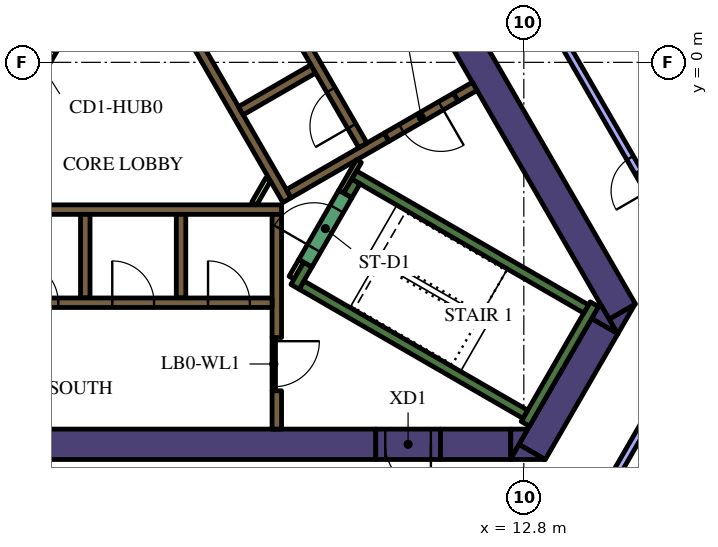
"""IFC4 building model, lengths in metres.
Left out: names, types, materials, properties, quantities, classifications, styles, units other than length and angle.
Written with IfcOpenShell. Run it as: python <this file> out.ifc"""

import sys

from ifc_helpers import new_model, si_unit, direction, frame, frame_2d, origin, place, context, subcontext, project, spatial, polyline, rectangle, outline, extrude, element, fill, save


model = new_model("IFC4")
c1 = context("Model", 3, precision=1e-05, world=origin(), true_north=direction((0.0, 1.0)))
c2 = subcontext(c1, "Body", "Model", "MODEL_VIEW")
j1 = project(units=[si_unit("LENGTHUNIT", "METRE"), si_unit("PLANEANGLEUNIT", "RADIAN")], contexts=[c1])
p1 = place(None, origin())
s1 = spatial("IfcSite", under=j1, at=p1, CompositionType="ELEMENT")
p2 = place(p1, origin())
s2 = spatial("IfcBuilding", under=s1, at=p2, CompositionType="ELEMENT")
p3 = place(p2, frame((0.0, 0.0, 187.8)))
s3 = spatial("IfcBuildingStorey", under=s2, at=p3, CompositionType="ELEMENT", Elevation=187.8)
p4 = place(p3, frame((9.129, 4.289, 0.0), z_axis=(0.0, 0.0, 1.0), x_axis=(0.499995742806, -0.866027861663, 0.0)))
e1 = element("IfcWall", 1, at=p4, inside=s3, PredefinedType="SOLIDWALL", context=c2, shape_type="SweptSolid", body=[
    extrude(rectangle(XDim=12.527, YDim=0.8, at=frame_2d((6.264, 0.0))), origin(), (0.0, 0.0, 1.0), 4.2),
])
p5 = place(p3, origin())
e2 = element("IfcWall", 2, at=p5, inside=s3, PredefinedType="SOLIDWALL", context=c2, shape_type="SweptSolid", body=[
    extrude(outline(polyline([(15.271, -7.15), (15.047, -6.762), (15.719, -6.374), (15.271, -7.15)])), origin(), (0.0, 0.0, 1.0), 4.2),
])
p6 = place(p3, frame((13.018, -10.252, 0.0), z_axis=(0.0, 0.0, 1.0), x_axis=(0.499984020225, 0.866034629516, 0.0)))
e3 = element("IfcWall", 3, at=p6, inside=s3, PredefinedType="SOLIDWALL", context=c2, shape_type="SweptSolid", body=[
    extrude(rectangle(XDim=3.824, YDim=0.8, at=frame_2d((1.912, 0.0))), origin(), (0.0, 0.0, 1.0), 4.2),
])
e4 = element("IfcWall", 4, at=p5, inside=s3, PredefinedType="SOLIDWALL", context=c2, shape_type="SweptSolid", body=[
    extrude(outline(polyline([(12.671, -10.053), (13.358, -10.45), (12.442, -10.45), (12.671, -10.053)])), origin(), (0.0, 0.0, 1.0), 4.2),
])
e5 = element("IfcWall", 5, at=p5, inside=s3, PredefinedType="SOLIDWALL", context=c2, shape_type="SweptSolid", body=[
    extrude(outline(polyline([(14.809, -6.35), (15.257, -7.126), (14.585, -6.738), (14.809, -6.35)])), origin(), (0.0, 0.0, 1.0), 4.2),
])
p7 = place(p3, frame((10.604, -10.05, 0.0), z_axis=(0.0, 0.0, 1.0), x_axis=(1.0, 0.0, 0.0)))
e6 = element("IfcWall", 6, at=p7, inside=s3, PredefinedType="SOLIDWALL", context=c2, shape_type="SweptSolid", body=[
    extrude(rectangle(XDim=1.849, YDim=0.8, at=frame_2d((0.925, 0.0))), origin(), (0.0, 0.0, 1.0), 4.2),
])
e7 = element("IfcWall", 7, at=p5, inside=s3, PredefinedType="SOLIDWALL", context=c2, shape_type="SweptSolid", body=[
    extrude(outline(polyline([(12.904, -9.65), (12.456, -10.426), (12.456, -9.65), (12.904, -9.65)])), origin(), (0.0, 0.0, 1.0), 4.2),
])
p8 = place(p3, frame((-13.378, -10.05, 0.0), z_axis=(0.0, 0.0, 1.0), x_axis=(1.0, 0.0, 0.0)))
e8 = element("IfcWall", 8, at=p8, inside=s3, PredefinedType="SOLIDWALL", context=c2, shape_type="SweptSolid", body=[
    extrude(rectangle(XDim=22.282, YDim=0.8, at=frame_2d((11.141, 0.0))), origin(), (0.0, 0.0, 1.0), 4.2),
])
p9 = place(p3, frame((12.84, -9.511, 0.0), z_axis=(0.0, 0.0, 1.0), x_axis=(0.499997733992, 0.866026712061, 0.0)))
e9 = element("IfcWall", 9, at=p9, inside=s3, PredefinedType="SOLIDWALL", context=c2, shape_type="SweptSolid", body=[
    extrude(rectangle(XDim=3.634, YDim=0.25, at=frame_2d((1.817, 0.0))), origin(), (0.0, 0.0, 1.0), 4.2),
])
p10 = place(p3, frame((12.84, -9.261, 0.0), z_axis=(0.0, 0.0, 1.0), x_axis=(-0.866013990052, 0.500019768644, 0.0)))
e10 = element("IfcWall", 10, at=p10, inside=s3, PredefinedType="SOLIDWALL", context=c2, shape_type="SweptSolid", body=[
    extrude(rectangle(XDim=6.8, YDim=0.25, at=frame_2d((3.4, 0.0))), origin(), (0.0, 0.0, 1.0), 4.2),
])
p11 = place(p3, frame((6.78, -5.906, 0.0), z_axis=(0.0, 0.0, 1.0), x_axis=(0.500223362819, 0.865896406789, 0.0)))
e11 = element("IfcWall", 11, at=p11, inside=s3, PredefinedType="SOLIDWALL", context=c2, shape_type="SweptSolid", body=[
    extrude(rectangle(XDim=0.675, YDim=0.25, at=frame_2d((0.337, 0.0))), origin(), (0.0, 0.0, 1.0), 4.2),
])
p12 = place(p3, frame((8.334, -2.964, 0.0), z_axis=(0.0, 0.0, 1.0), x_axis=(0.866016039709, -0.500016218704, 0.0)))
e12 = element("IfcWall", 12, at=p12, inside=s3, PredefinedType="SOLIDWALL", context=c2, shape_type="SweptSolid", body=[
    extrude(rectangle(XDim=7.05, YDim=0.25, at=frame_2d((3.525, 0.0))), origin(), (0.0, 0.0, 1.0), 4.2),
])
p13 = place(p3, frame((8.168, -3.503, 0.0), z_axis=(0.0, 0.0, 1.0), x_axis=(0.49972245349, 0.866185586049, 0.0)))
e13 = element("IfcWall", 13, at=p13, inside=s3, PredefinedType="SOLIDWALL", context=c2, shape_type="SweptSolid", body=[
    extrude(rectangle(XDim=0.425, YDim=0.25, at=frame_2d((0.212, 0.0))), origin(), (0.0, 0.0, 1.0), 4.2),
])
p14 = place(p3, frame((-5.545, -3.875, 0.0), z_axis=(0.0, 0.0, 1.0), x_axis=(1.0, 0.0, 0.0)))
e14 = element("IfcWall", 14, at=p14, inside=s3, PredefinedType="SOLIDWALL", context=c2, shape_type="SweptSolid", body=[
    extrude(rectangle(XDim=11.97, YDim=0.25, at=frame_2d((5.985, 0.0))), origin(), (0.0, 0.0, 1.0), 4.2),
])
p15 = place(p3, frame((6.3, -7.24, 0.0), z_axis=(0.0, 0.0, 1.0), x_axis=(0.0, 1.0, 0.0)))
e15 = element("IfcWall", 15, at=p15, inside=s3, PredefinedType="SOLIDWALL", context=c2, shape_type="SweptSolid", body=[
    extrude(rectangle(XDim=3.24, YDim=0.25, at=frame_2d((1.62, 0.0))), origin(), (0.0, 0.0, 1.0), 4.2),
])
p16 = place(p3, frame((6.3, -9.65, 0.0), z_axis=(0.0, 0.0, 1.0), x_axis=(0.0, 1.0, 0.0)))
e16 = element("IfcWall", 16, at=p16, inside=s3, PredefinedType="SOLIDWALL", context=c2, shape_type="SweptSolid", body=[
    extrude(rectangle(XDim=1.008, YDim=0.25, at=frame_2d((0.504, 0.0))), origin(), (0.0, 0.0, 1.0), 4.2),
])
for number, where, z_axis, x_axis in (
    (17, (3.78, -4.0, 0.0), (0.0, 0.0, 1.0), (0.0, -1.0, 0.0)),
    (18, (1.26, -4.0, 0.0), (0.0, 0.0, 1.0), (0.0, -1.0, 0.0)),
):
    element("IfcWall", number, at=place(p3, frame(where, z_axis=z_axis, x_axis=x_axis)), inside=s3, PredefinedType="SOLIDWALL", context=c2, shape_type="SweptSolid", body=[
        extrude(rectangle(XDim=2.2, YDim=0.25, at=frame_2d((1.1, 0.0))), origin(), (0.0, 0.0, 1.0), 4.2),
    ])
p17 = place(p3, frame((11.507, -0.631, 0.0), z_axis=(0.0, 0.0, 1.0), x_axis=(-0.866093731455, -0.499881634324, 0.0)))
e19 = element("IfcWall", 19, at=p17, inside=s3, PredefinedType="SOLIDWALL", context=c2, shape_type="SweptSolid", body=[
    extrude(rectangle(XDim=0.575, YDim=0.25, at=frame_2d((0.288, 0.0))), origin(), (0.0, 0.0, 1.0), 4.2),
])
p18 = place(p3, frame((6.568, -3.627, 0.0), z_axis=(0.0, 0.0, 1.0), x_axis=(-0.499999455981, 0.866025717874, 0.0)))
e20 = element("IfcWall", 20, at=p18, inside=s3, PredefinedType="SOLIDWALL", context=c2, shape_type="SweptSolid", body=[
    extrude(rectangle(XDim=11.978, YDim=0.25, at=frame_2d((5.989, 0.0))), origin(), (0.0, 0.0, 1.0), 4.2),
])
p19 = place(p3, frame((5.354, -1.274, 0.0), z_axis=(0.0, 0.0, 1.0), x_axis=(0.866008176907, 0.50002983664, 0.0)))
e21 = element("IfcWall", 21, at=p19, inside=s3, PredefinedType="SOLIDWALL", context=c2, shape_type="SweptSolid", body=[
    extrude(rectangle(XDim=2.2, YDim=0.25, at=frame_2d((1.1, 0.0))), origin(), (0.0, 0.0, 1.0), 4.2),
])
p20 = place(p3, frame((6.614, -3.456, 0.0), z_axis=(0.0, 0.0, 1.0), x_axis=(0.866032512851, 0.499987686533, 0.0)))
e22 = element("IfcWall", 22, at=p20, inside=s3, PredefinedType="SOLIDWALL", context=c2, shape_type="SweptSolid", body=[
    extrude(rectangle(XDim=2.975, YDim=0.25, at=frame_2d((1.487, 0.0))), origin(), (0.0, 0.0, 1.0), 4.2),
])
p21 = place(p3, frame((6.945, -5.222, 0.0), z_axis=(0.0, 0.0, 1.0), x_axis=(-0.499818422106, -0.866130212453, 0.0)))
e23 = element("IfcWall", 23, at=p21, inside=s3, PredefinedType="PARTITIONING", context=c2, shape_type="SweptSolid", body=[
    extrude(rectangle(XDim=0.514, YDim=0.15, at=frame_2d((0.257, 0.0))), origin(), (0.0, 0.0, 1.0), 3.15),
])
p22 = place(p3, frame((8.459, -2.599, 0.0), z_axis=(0.0, 0.0, 1.0), x_axis=(-0.500041054325, -0.866001699761, 0.0)))
e24 = element("IfcWall", 24, at=p22, inside=s3, PredefinedType="PARTITIONING", context=c2, shape_type="SweptSolid", body=[
    extrude(rectangle(XDim=0.929, YDim=0.15, at=frame_2d((0.464, 0.0))), origin(), (0.0, 0.0, 1.0), 4.2),
])
p23 = place(p3, frame((5.705, -3.718, 0.0), z_axis=(0.0, 0.0, 1.0), x_axis=(0.499962090823, 0.866047289552, 0.0)))
e25 = element("IfcWall", 25, at=p23, inside=s3, PredefinedType="PARTITIONING", context=c2, shape_type="SweptSolid", body=[
    extrude(rectangle(XDim=0.735, YDim=0.15, at=frame_2d((0.367, 0.0))), origin(), (0.0, 0.0, 1.0), 3.15),
])
p24 = place(p3, frame((-6.175, -6.325, 0.0), z_axis=(0.0, 0.0, 1.0), x_axis=(1.0, 0.0, 0.0)))
e26 = element("IfcWall", 26, at=p24, inside=s3, PredefinedType="SOLIDWALL", context=c2, shape_type="SweptSolid", body=[
    extrude(rectangle(XDim=12.35, YDim=0.25, at=frame_2d((6.175, 0.0))), origin(), (0.0, 0.0, 1.0), 4.2),
])
p25 = place(p24, frame((0.585, 0.0, 0.0)))
e27 = element("IfcOpeningElement", 27, at=p25, cuts=e26, PredefinedType="OPENING", context=c2, shape_type="SweptSolid", body=[
    extrude(rectangle(XDim=1.1, YDim=2.1, at=frame_2d((0.55, 1.05))), frame((0.0, 0.135, 0.0), z_axis=(0.0, -1.0, 0.0), x_axis=(1.0, 0.0, 0.0)), (0.0, 0.0, 1.0), 0.27),
])
p26 = place(p24, frame((3.105, 0.0, 0.0)))
e28 = element("IfcOpeningElement", 28, at=p26, cuts=e26, PredefinedType="OPENING", context=c2, shape_type="SweptSolid", body=[
    extrude(rectangle(XDim=1.1, YDim=2.1, at=frame_2d((0.55, 1.05))), frame((0.0, 0.135, 0.0), z_axis=(0.0, -1.0, 0.0), x_axis=(1.0, 0.0, 0.0)), (0.0, 0.0, 1.0), 0.27),
])
p27 = place(p24, frame((5.625, 0.0, 0.0)))
e29 = element("IfcOpeningElement", 29, at=p27, cuts=e26, PredefinedType="OPENING", context=c2, shape_type="SweptSolid", body=[
    extrude(rectangle(XDim=1.1, YDim=2.1, at=frame_2d((0.55, 1.05))), frame((0.0, 0.135, 0.0), z_axis=(0.0, -1.0, 0.0), x_axis=(1.0, 0.0, 0.0)), (0.0, 0.0, 1.0), 0.27),
])
p28 = place(p24, frame((8.145, 0.0, 0.0)))
e30 = element("IfcOpeningElement", 30, at=p28, cuts=e26, PredefinedType="OPENING", context=c2, shape_type="SweptSolid", body=[
    extrude(rectangle(XDim=1.1, YDim=2.1, at=frame_2d((0.55, 1.05))), frame((0.0, 0.135, 0.0), z_axis=(0.0, -1.0, 0.0), x_axis=(1.0, 0.0, 0.0)), (0.0, 0.0, 1.0), 0.27),
])
p29 = place(p24, frame((10.665, 0.0, 0.0)))
e31 = element("IfcOpeningElement", 31, at=p29, cuts=e26, PredefinedType="OPENING", context=c2, shape_type="SweptSolid", body=[
    extrude(rectangle(XDim=1.1, YDim=2.1, at=frame_2d((0.55, 1.05))), frame((0.0, 0.135, 0.0), z_axis=(0.0, -1.0, 0.0), x_axis=(1.0, 0.0, 0.0)), (0.0, 0.0, 1.0), 0.27),
])
p30 = place(p3, frame((8.565, -2.185, 0.0), z_axis=(0.0, 0.0, 1.0), x_axis=(-0.499997954832, 0.866026584559, 0.0)))
e32 = element("IfcWall", 32, at=p30, inside=s3, PredefinedType="SOLIDWALL", context=c2, shape_type="SweptSolid", body=[
    extrude(rectangle(XDim=12.35, YDim=0.25, at=frame_2d((6.175, 0.0))), origin(), (0.0, 0.0, 1.0), 4.2),
])
p31 = place(p30, frame((0.585, 0.0, 0.0)))
e33 = element("IfcOpeningElement", 33, at=p31, cuts=e32, PredefinedType="OPENING", context=c2, shape_type="SweptSolid", body=[
    extrude(rectangle(XDim=1.1, YDim=2.1, at=frame_2d((0.55, 1.05))), frame((0.0, 0.135, 0.0), z_axis=(0.0, -1.0, 0.0), x_axis=(1.0, 0.0, 0.0)), (0.0, 0.0, 1.0), 0.27),
])
p32 = place(p3, frame((7.053, -5.284, 0.0), z_axis=(0.0, 0.0, 1.0), x_axis=(0.500078061341, 0.865980330357, 0.0)))
e34 = element("IfcWall", 34, at=p32, inside=s3, PredefinedType="SOLIDWALL", context=c2, shape_type="SweptSolid", body=[
    extrude(rectangle(XDim=2.1, YDim=0.4, at=frame_2d((1.05, 0.0))), origin(), (0.0, 0.0, 1.0), 4.2),
])
p33 = place(p32, frame((0.45, 0.0, 0.0)))
e35 = element("IfcOpeningElement", 35, at=p33, cuts=e34, PredefinedType="OPENING", context=c2, shape_type="SweptSolid", body=[
    extrude(rectangle(XDim=1.2, YDim=2.1, at=frame_2d((0.6, 1.05))), frame((0.0, 0.21, 0.0), z_axis=(0.0, -1.0, 0.0), x_axis=(1.0, 0.0, 0.0)), (0.0, 0.0, 1.0), 0.42),
])
p34 = place(p3, frame((-0.427, -0.966, 0.0), z_axis=(0.0, 0.0, 1.0), x_axis=(0.49994051562, 0.866059744384, 0.0)))
e36 = element("IfcWall", 36, at=p34, inside=s3, PredefinedType="PARTITIONING", context=c2, shape_type="SweptSolid", body=[
    extrude(rectangle(XDim=2.1, YDim=0.375, at=frame_2d((1.05, 0.0))), origin(), (0.0, 0.0, 1.0), 3.15),
])
p35 = place(p34, frame((0.6, 0.0, 0.0)))
e37 = element("IfcOpeningElement", 37, at=p35, cuts=e36, PredefinedType="OPENING", context=c2, shape_type="SweptSolid", body=[
    extrude(rectangle(XDim=0.9, YDim=2.1, at=frame_2d((0.45, 1.05))), frame((0.0, 0.198, 0.0), z_axis=(0.0, -1.0, 0.0), x_axis=(1.0, 0.0, 0.0)), (0.0, 0.0, 1.0), 0.395),
])
p36 = place(p3, frame((6.22, -7.237, 0.0), z_axis=(0.0, 0.0, 1.0), x_axis=(0.0, -1.0, 0.0)))
e38 = element("IfcWall", 38, at=p36, inside=s3, PredefinedType="PARTITIONING", context=c2, shape_type="SweptSolid", body=[
    extrude(rectangle(XDim=1.4, YDim=0.09, at=frame_2d((0.7, 0.0))), origin(), (0.0, 0.0, 1.0), 3.15),
])
p37 = place(p36, frame((0.1, 0.0, 0.0)))
e39 = element("IfcOpeningElement", 39, at=p37, cuts=e38, PredefinedType="OPENING", context=c2, shape_type="SweptSolid", body=[
    extrude(rectangle(XDim=1.2, YDim=2.1, at=frame_2d((0.6, 1.05))), frame((0.0, 0.055, 0.0), z_axis=(0.0, -1.0, 0.0), x_axis=(1.0, 0.0, 0.0)), (0.0, 0.0, 1.0), 0.11),
])
p38 = place(p3, frame((11.009, -0.919, 0.0), z_axis=(0.0, 0.0, 1.0), x_axis=(-0.866059744384, -0.49994051562, 0.0)))
e40 = element("IfcWall", 40, at=p38, inside=s3, PredefinedType="SOLIDWALL", context=c2, shape_type="SweptSolid", body=[
    extrude(rectangle(XDim=2.1, YDim=0.25, at=frame_2d((1.05, 0.0))), origin(), (0.0, 0.0, 1.0), 4.2),
])
p39 = place(p38, frame((0.45, 0.0, 0.0)))
e41 = element("IfcOpeningElement", 41, at=p39, cuts=e40, PredefinedType="OPENING", context=c2, shape_type="SweptSolid", body=[
    extrude(rectangle(XDim=1.2, YDim=2.1, at=frame_2d((0.6, 1.05))), frame((0.0, 0.135, 0.0), z_axis=(0.0, -1.0, 0.0), x_axis=(1.0, 0.0, 0.0)), (0.0, 0.0, 1.0), 0.27),
])
p40 = place(p3, frame((10.604, -10.05, 0.0), z_axis=(0.0, 0.0, 1.0), x_axis=(-1.0, 0.0, 0.0)))
e42 = element("IfcWall", 42, at=p40, inside=s3, PredefinedType="SOLIDWALL", context=c2, shape_type="SweptSolid", body=[
    extrude(rectangle(XDim=1.7, YDim=0.8, at=frame_2d((0.85, 0.0))), origin(), (0.0, 0.0, 1.0), 4.2),
])
p41 = place(p40, frame((0.25, 0.0, 0.0)))
e43 = element("IfcOpeningElement", 43, at=p41, cuts=e42, PredefinedType="OPENING", context=c2, shape_type="SweptSolid", body=[
    extrude(rectangle(XDim=1.2, YDim=2.1, at=frame_2d((0.6, 1.05))), frame((0.0, 0.41, 0.0), z_axis=(0.0, -1.0, 0.0), x_axis=(1.0, 0.0, 0.0)), (0.0, 0.0, 1.0), 0.82),
])
p42 = place(p3, frame((14.42, -12.224, 0.0), z_axis=(0.0, 0.0, 1.0), x_axis=(0.500001965626, 0.866024268927, 0.0)))
e44 = element("IfcWall", 44, at=p42, inside=s3, PredefinedType="PARTITIONING", context=c2, shape_type="SweptSolid", body=[
    extrude(rectangle(XDim=3.276, YDim=0.2, at=frame_2d((1.638, 0.0))), origin(), (0.0, 0.0, 1.0), 3.15),
])
p43 = place(p3, frame((17.796, -6.324, 0.0), z_axis=(0.0, 0.0, 1.0), x_axis=(-0.500026166427, 0.866010296064, 0.0)))
e45 = element("IfcWall", 45, at=p43, inside=s3, PredefinedType="PARTITIONING", context=c2, shape_type="SweptSolid", body=[
    extrude(rectangle(XDim=7.863, YDim=0.2, at=frame_2d((3.931, 0.0))), origin(), (0.0, 0.0, 1.0), 3.15),
])
p44 = place(p43, frame((3.4, 0.0, 0.0)))
e46 = element("IfcOpeningElement", 46, at=p44, cuts=e45, PredefinedType="OPENING", context=c2, shape_type="SweptSolid", body=[
    extrude(rectangle(XDim=1.0, YDim=2.1, at=frame_2d((0.5, 1.05))), frame((0.0, 0.11, 0.0), z_axis=(0.0, -1.0, 0.0), x_axis=(1.0, 0.0, 0.0)), (0.0, 0.0, 1.0), 0.22),
])
p45 = place(p27, origin())
e47 = element("IfcDoor", 47, at=p45, inside=s3, OperationType="DOUBLE_DOOR_SLIDING", PredefinedType="DOOR", context=c2, shape_type="SweptSolid", body=[
    extrude(rectangle(XDim=1.1, YDim=2.1, at=frame_2d((0.55, 1.05))), frame((0.0, 0.025, 0.0), z_axis=(0.0, -1.0, 0.0), x_axis=(1.0, 0.0, 0.0)), (0.0, 0.0, 1.0), 0.05),
])
fill(e29, e47)
p46 = place(p28, origin())
e48 = element("IfcDoor", 48, at=p46, inside=s3, OperationType="DOUBLE_DOOR_SLIDING", PredefinedType="DOOR", context=c2, shape_type="SweptSolid", body=[
    extrude(rectangle(XDim=1.1, YDim=2.1, at=frame_2d((0.55, 1.05))), frame((0.0, 0.025, 0.0), z_axis=(0.0, -1.0, 0.0), x_axis=(1.0, 0.0, 0.0)), (0.0, 0.0, 1.0), 0.05),
])
fill(e30, e48)
p47 = place(p29, origin())
e49 = element("IfcDoor", 49, at=p47, inside=s3, OperationType="DOUBLE_DOOR_SLIDING", PredefinedType="DOOR", context=c2, shape_type="SweptSolid", body=[
    extrude(rectangle(XDim=1.1, YDim=2.1, at=frame_2d((0.55, 1.05))), frame((0.0, 0.025, 0.0), z_axis=(0.0, -1.0, 0.0), x_axis=(1.0, 0.0, 0.0)), (0.0, 0.0, 1.0), 0.05),
])
fill(e31, e49)
p48 = place(p31, origin())
e50 = element("IfcDoor", 50, at=p48, inside=s3, OperationType="DOUBLE_DOOR_SLIDING", PredefinedType="DOOR", context=c2, shape_type="SweptSolid", body=[
    extrude(rectangle(XDim=1.1, YDim=2.1, at=frame_2d((0.55, 1.05))), frame((0.0, 0.025, 0.0), z_axis=(0.0, -1.0, 0.0), x_axis=(1.0, 0.0, 0.0)), (0.0, 0.0, 1.0), 0.05),
])
fill(e33, e50)
p49 = place(p33, origin())
e51 = element("IfcDoor", 51, at=p49, inside=s3, OperationType="SINGLE_SWING_LEFT", PredefinedType="DOOR", context=c2, shape_type="SweptSolid", body=[
    extrude(rectangle(XDim=1.2, YDim=2.1, at=frame_2d((0.6, 1.05))), frame((0.0, 0.025, 0.0), z_axis=(0.0, -1.0, 0.0), x_axis=(1.0, 0.0, 0.0)), (0.0, 0.0, 1.0), 0.05),
])
fill(e35, e51)
p50 = place(p37, origin())
e52 = element("IfcDoor", 52, at=p50, inside=s3, OperationType="SINGLE_SWING_LEFT", PredefinedType="DOOR", context=c2, shape_type="SweptSolid", body=[
    extrude(rectangle(XDim=1.2, YDim=2.1, at=frame_2d((0.6, 1.05))), frame((0.0, 0.025, 0.0), z_axis=(0.0, -1.0, 0.0), x_axis=(1.0, 0.0, 0.0)), (0.0, 0.0, 1.0), 0.05),
])
fill(e39, e52)
p51 = place(p39, origin())
e53 = element("IfcDoor", 53, at=p51, inside=s3, OperationType="SINGLE_SWING_LEFT", PredefinedType="DOOR", context=c2, shape_type="SweptSolid", body=[
    extrude(rectangle(XDim=1.2, YDim=2.1, at=frame_2d((0.6, 1.05))), frame((0.0, 0.025, 0.0), z_axis=(0.0, -1.0, 0.0), x_axis=(1.0, 0.0, 0.0)), (0.0, 0.0, 1.0), 0.05),
])
fill(e41, e53)
p52 = place(p41, origin())
e54 = element("IfcDoor", 54, at=p52, inside=s3, OperationType="SINGLE_SWING_LEFT", PredefinedType="DOOR", context=c2, shape_type="SweptSolid", body=[
    extrude(rectangle(XDim=1.2, YDim=2.1, at=frame_2d((0.6, 1.05))), frame((0.0, 0.025, 0.0), z_axis=(0.0, -1.0, 0.0), x_axis=(1.0, 0.0, 0.0)), (0.0, 0.0, 1.0), 0.05),
])
fill(e43, e54)
p53 = place(p44, origin())
e55 = element("IfcDoor", 55, at=p53, inside=s3, OperationType="SINGLE_SWING_LEFT", PredefinedType="DOOR", context=c2, shape_type="SweptSolid", body=[
    extrude(rectangle(XDim=1.0, YDim=2.1, at=frame_2d((0.5, 1.05))), frame((0.0, 0.025, 0.0), z_axis=(0.0, -1.0, 0.0), x_axis=(1.0, 0.0, 0.0)), (0.0, 0.0, 1.0), 0.05),
])
fill(e46, e55)
save(model, sys.argv[1])
